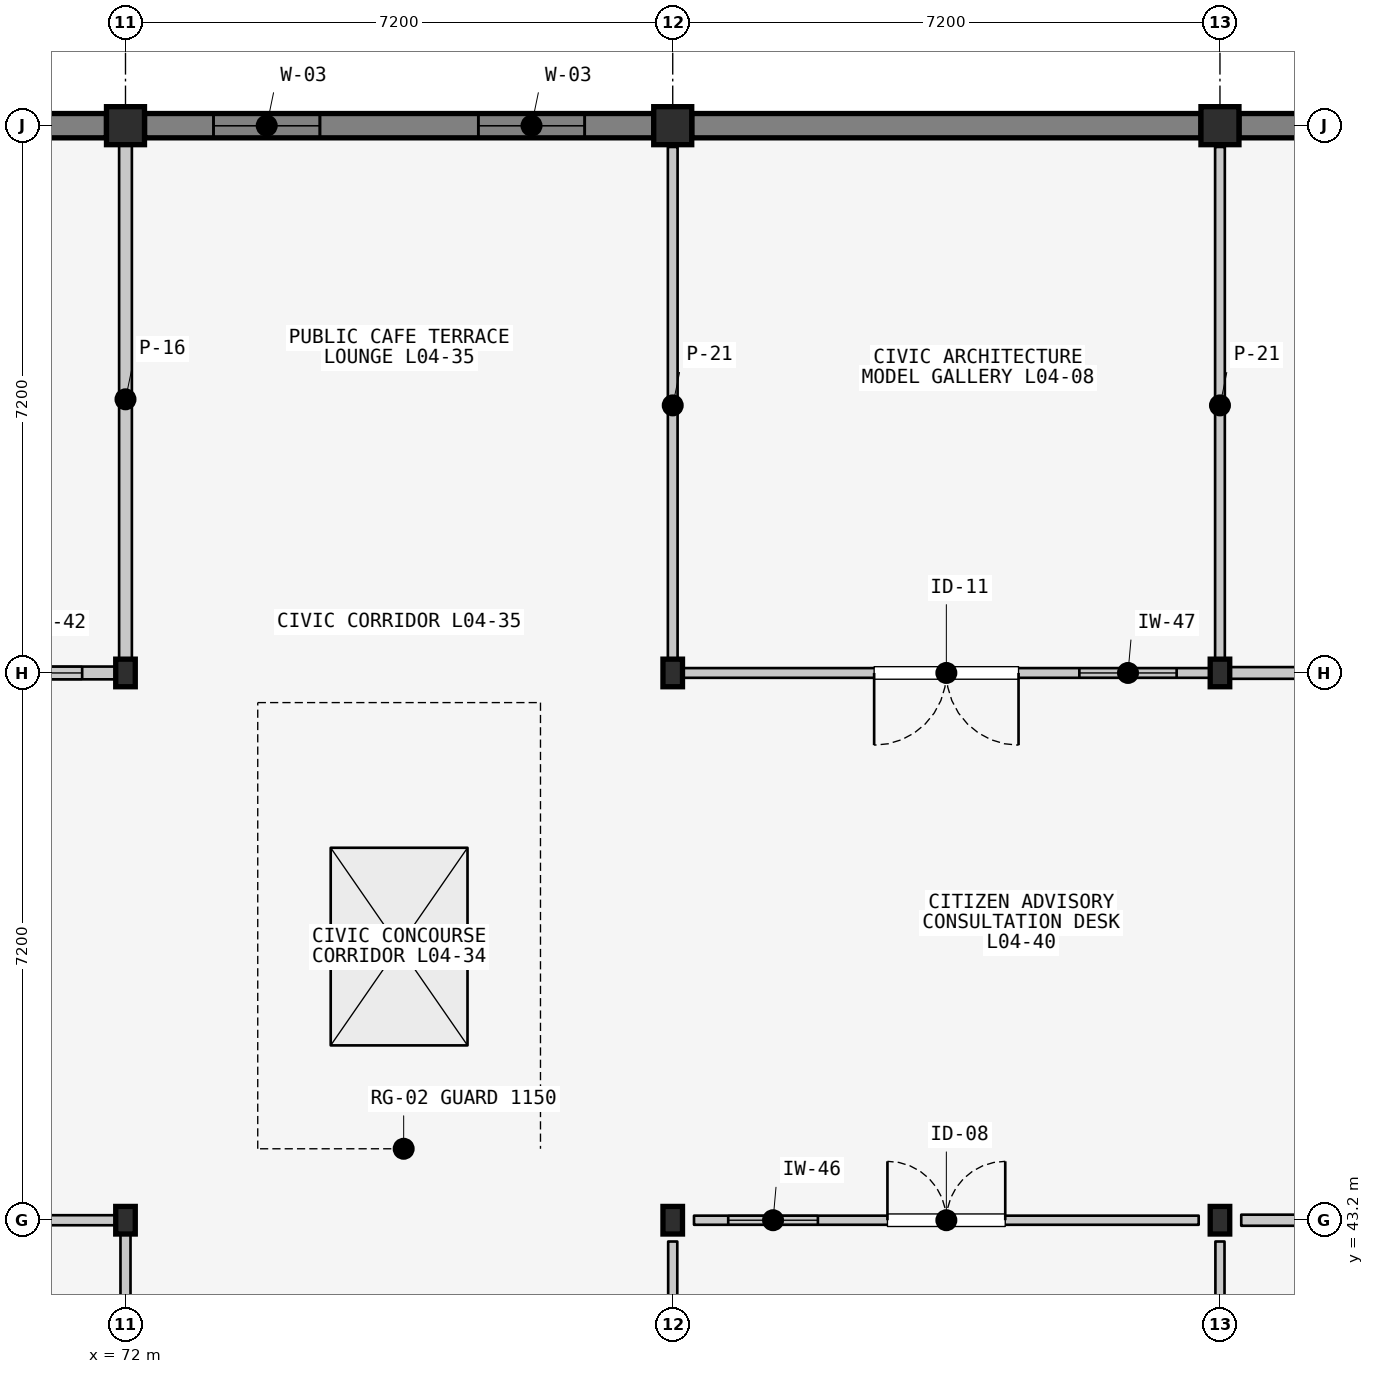
"""IFC4 building model, lengths in metres.
Left out: names, types, materials, properties, quantities, classifications, styles, units other than length and angle.
Written with IfcOpenShell. Run it as: python <this file> out.ifc"""

import sys

from ifc_helpers import new_model, si_unit, direction, frame, frame_2d, origin, origin_2d, place, context, subcontext, project, spatial, rectangle, i_section, extrude, element, fill, save


model = new_model("IFC4")
c1 = context("Model", 3, precision=1e-05, world=origin(), true_north=direction((0.0, 1.0)))
c2 = subcontext(c1, "Body", "Model", "MODEL_VIEW")
j1 = project(units=[si_unit("LENGTHUNIT", "METRE"), si_unit("PLANEANGLEUNIT", "RADIAN")], contexts=[c1])
p1 = place(None, origin())
s1 = spatial("IfcSite", under=j1, at=p1, CompositionType="ELEMENT")
p2 = place(p1, origin())
s2 = spatial("IfcBuilding", under=s1, at=p2, CompositionType="ELEMENT")
p3 = place(p2, frame((0.0, 0.0, 14.1)))
s3 = spatial("IfcBuildingStorey", under=s2, at=p3, CompositionType="ELEMENT", Elevation=14.1)
p4 = place(p3, frame((72.0, 43.2, 0.0), z_axis=(0.0, 0.0, 1.0), x_axis=(1.0, 0.0, 0.0)))
e1 = element("IfcColumn", 1, at=p4, inside=s3, PredefinedType="COLUMN", context=c2, shape_type="SweptSolid", body=[
    extrude(i_section(OverallWidth=0.257, OverallDepth=0.363, WebThickness=0.013, FlangeThickness=0.022, FilletRadius=0.015, at=origin_2d()), origin(), (0.0, 0.0, 1.0), 11.619),
])
p5 = place(p3, frame((72.0, 50.4, 0.0), z_axis=(0.0, 0.0, 1.0), x_axis=(1.0, 0.0, 0.0)))
e2 = element("IfcColumn", 2, at=p5, inside=s3, PredefinedType="COLUMN", context=c2, shape_type="SweptSolid", body=[
    extrude(i_section(OverallWidth=0.257, OverallDepth=0.363, WebThickness=0.013, FlangeThickness=0.022, FilletRadius=0.015, at=origin_2d()), origin(), (0.0, 0.0, 1.0), 12.962),
])
p6 = place(p3, frame((72.0, 57.6, 0.0), z_axis=(0.0, 0.0, 1.0), x_axis=(1.0, 0.0, 0.0)))
e3 = element("IfcColumn", 3, at=p6, inside=s3, PredefinedType="COLUMN", context=c2, shape_type="SweptSolid", body=[
    extrude(rectangle(XDim=0.5, YDim=0.5, at=origin_2d()), origin(), (0.0, 0.0, 1.0), 14.305),
])
p7 = place(p3, frame((79.2, 43.2, 0.0), z_axis=(0.0, 0.0, 1.0), x_axis=(1.0, 0.0, 0.0)))
e4 = element("IfcColumn", 4, at=p7, inside=s3, PredefinedType="COLUMN", context=c2, shape_type="SweptSolid", body=[
    extrude(i_section(OverallWidth=0.257, OverallDepth=0.363, WebThickness=0.013, FlangeThickness=0.022, FilletRadius=0.015, at=origin_2d()), origin(), (0.0, 0.0, 1.0), 11.647),
])
p8 = place(p3, frame((79.2, 50.4, 0.0), z_axis=(0.0, 0.0, 1.0), x_axis=(1.0, 0.0, 0.0)))
e5 = element("IfcColumn", 5, at=p8, inside=s3, PredefinedType="COLUMN", context=c2, shape_type="SweptSolid", body=[
    extrude(i_section(OverallWidth=0.257, OverallDepth=0.363, WebThickness=0.013, FlangeThickness=0.022, FilletRadius=0.015, at=origin_2d()), origin(), (0.0, 0.0, 1.0), 12.99),
])
p9 = place(p3, frame((79.2, 57.6, 0.0), z_axis=(0.0, 0.0, 1.0), x_axis=(1.0, 0.0, 0.0)))
e6 = element("IfcColumn", 6, at=p9, inside=s3, PredefinedType="COLUMN", context=c2, shape_type="SweptSolid", body=[
    extrude(rectangle(XDim=0.5, YDim=0.5, at=origin_2d()), origin(), (0.0, 0.0, 1.0), 14.333),
])
p10 = place(p3, frame((86.4, 43.2, 0.0), z_axis=(0.0, 0.0, 1.0), x_axis=(1.0, 0.0, 0.0)))
e7 = element("IfcColumn", 7, at=p10, inside=s3, PredefinedType="COLUMN", context=c2, shape_type="SweptSolid", body=[
    extrude(i_section(OverallWidth=0.257, OverallDepth=0.363, WebThickness=0.013, FlangeThickness=0.022, FilletRadius=0.015, at=origin_2d()), origin(), (0.0, 0.0, 1.0), 11.676),
])
p11 = place(p3, frame((86.4, 50.4, 0.0), z_axis=(0.0, 0.0, 1.0), x_axis=(1.0, 0.0, 0.0)))
e8 = element("IfcColumn", 8, at=p11, inside=s3, PredefinedType="COLUMN", context=c2, shape_type="SweptSolid", body=[
    extrude(i_section(OverallWidth=0.257, OverallDepth=0.363, WebThickness=0.013, FlangeThickness=0.022, FilletRadius=0.015, at=origin_2d()), origin(), (0.0, 0.0, 1.0), 13.019),
])
p12 = place(p3, frame((86.4, 57.6, 0.0), z_axis=(0.0, 0.0, 1.0), x_axis=(1.0, 0.0, 0.0)))
e9 = element("IfcColumn", 9, at=p12, inside=s3, PredefinedType="COLUMN", context=c2, shape_type="SweptSolid", body=[
    extrude(rectangle(XDim=0.5, YDim=0.5, at=origin_2d()), origin(), (0.0, 0.0, 1.0), 14.362),
])
p13 = place(p3, frame((65.05, 57.6, 0.0), z_axis=(0.0, 0.0, 1.0), x_axis=(1.0, 0.0, 0.0)))
e10 = element("IfcWall", 10, at=p13, inside=s3, PredefinedType="SOLIDWALL", context=c2, shape_type="SweptSolid", body=[
    extrude(rectangle(XDim=6.7, YDim=0.32, at=frame_2d((3.35, 0.0))), origin(), (0.0, 0.0, 1.0), 13.549),
])
p14 = place(p3, frame((72.25, 57.6, 0.0), z_axis=(0.0, 0.0, 1.0), x_axis=(1.0, 0.0, 0.0)))
e11 = element("IfcWall", 11, at=p14, inside=s3, PredefinedType="SOLIDWALL", context=c2, shape_type="SweptSolid", body=[
    extrude(rectangle(XDim=6.7, YDim=0.32, at=frame_2d((3.35, 0.0))), origin(), (0.0, 0.0, 1.0), 13.578),
])
p15 = place(p14, frame((0.908, 0.0, 0.95)))
e12 = element("IfcOpeningElement", 12, at=p15, cuts=e11, PredefinedType="OPENING", context=c2, shape_type="SweptSolid", body=[
    extrude(rectangle(XDim=1.4, YDim=2.1, at=frame_2d((0.7, 1.05))), frame((0.0, 0.17, 0.0), z_axis=(0.0, -1.0, 0.0), x_axis=(1.0, 0.0, 0.0)), (0.0, 0.0, 1.0), 0.34),
])
p16 = place(p14, frame((0.908, 0.0, 4.55)))
e13 = element("IfcOpeningElement", 13, at=p16, cuts=e11, PredefinedType="OPENING", context=c2, shape_type="SweptSolid", body=[
    extrude(rectangle(XDim=1.4, YDim=2.1, at=frame_2d((0.7, 1.05))), frame((0.0, 0.17, 0.0), z_axis=(0.0, -1.0, 0.0), x_axis=(1.0, 0.0, 0.0)), (0.0, 0.0, 1.0), 0.34),
])
p17 = place(p14, frame((4.392, 0.0, 0.95)))
e14 = element("IfcOpeningElement", 14, at=p17, cuts=e11, PredefinedType="OPENING", context=c2, shape_type="SweptSolid", body=[
    extrude(rectangle(XDim=1.4, YDim=2.1, at=frame_2d((0.7, 1.05))), frame((0.0, 0.17, 0.0), z_axis=(0.0, -1.0, 0.0), x_axis=(1.0, 0.0, 0.0)), (0.0, 0.0, 1.0), 0.34),
])
p18 = place(p14, frame((4.392, 0.0, 4.55)))
e15 = element("IfcOpeningElement", 15, at=p18, cuts=e11, PredefinedType="OPENING", context=c2, shape_type="SweptSolid", body=[
    extrude(rectangle(XDim=1.4, YDim=2.1, at=frame_2d((0.7, 1.05))), frame((0.0, 0.17, 0.0), z_axis=(0.0, -1.0, 0.0), x_axis=(1.0, 0.0, 0.0)), (0.0, 0.0, 1.0), 0.34),
])
p19 = place(p3, frame((79.45, 57.6, 0.0), z_axis=(0.0, 0.0, 1.0), x_axis=(1.0, 0.0, 0.0)))
e16 = element("IfcWall", 16, at=p19, inside=s3, PredefinedType="SOLIDWALL", context=c2, shape_type="SweptSolid", body=[
    extrude(rectangle(XDim=6.7, YDim=0.32, at=frame_2d((3.35, 0.0))), origin(), (0.0, 0.0, 1.0), 13.606),
])
p20 = place(p3, frame((86.65, 57.6, 0.0), z_axis=(0.0, 0.0, 1.0), x_axis=(1.0, 0.0, 0.0)))
e17 = element("IfcWall", 17, at=p20, inside=s3, PredefinedType="SOLIDWALL", context=c2, shape_type="SweptSolid", body=[
    extrude(rectangle(XDim=6.7, YDim=0.32, at=frame_2d((3.35, 0.0))), origin(), (0.0, 0.0, 1.0), 13.635),
])
for number, where, z_axis, x_axis in (
    (18, (72.0, 43.08, 0.0), (0.0, 0.0, 1.0), (0.0, -1.0, 0.0)),
    (19, (64.92, 43.2, 0.0), (0.0, 0.0, 1.0), (1.0, 0.0, 0.0)),
):
    element("IfcWall", number, at=place(p3, frame(where, z_axis=z_axis, x_axis=x_axis)), inside=s3, PredefinedType="PARTITIONING", context=c2, shape_type="SweptSolid", body=[
        extrude(rectangle(XDim=6.96, YDim=0.132, at=frame_2d((3.48, 0.0))), origin(), (0.0, 0.0, 1.0), 3.72),
    ])
p21 = place(p3, frame((71.88, 50.4, 0.0), z_axis=(0.0, 0.0, 1.0), x_axis=(-1.0, 0.0, 0.0)))
e20 = element("IfcWall", 20, at=p21, inside=s3, PredefinedType="PARTITIONING", context=c2, shape_type="SweptSolid", body=[
    extrude(rectangle(XDim=6.96, YDim=0.168, at=frame_2d((3.48, 0.0))), origin(), (0.0, 0.0, 1.0), 3.72),
])
p22 = place(p21, frame((2.53, 0.0, 0.0)))
e21 = element("IfcOpeningElement", 21, at=p22, cuts=e20, PredefinedType="OPENING", context=c2, shape_type="SweptSolid", body=[
    extrude(rectangle(XDim=1.9, YDim=2.45, at=frame_2d((0.95, 1.225))), frame((0.0, 0.094, 0.0), z_axis=(0.0, -1.0, 0.0), x_axis=(1.0, 0.0, 0.0)), (0.0, 0.0, 1.0), 0.188),
])
p23 = place(p21, frame((0.45, 0.0, 1.05)))
e22 = element("IfcOpeningElement", 22, at=p23, cuts=e20, PredefinedType="OPENING", context=c2, shape_type="SweptSolid", body=[
    extrude(rectangle(XDim=1.68, YDim=1.34, at=frame_2d((0.84, 0.67))), frame((0.0, 0.094, 0.0), z_axis=(0.0, -1.0, 0.0), x_axis=(1.0, 0.0, 0.0)), (0.0, 0.0, 1.0), 0.188),
])
p24 = place(p3, frame((72.0, 57.48, 0.0), z_axis=(0.0, 0.0, 1.0), x_axis=(0.0, -1.0, 0.0)))
e23 = element("IfcWall", 23, at=p24, inside=s3, PredefinedType="PARTITIONING", context=c2, shape_type="SweptSolid", body=[
    extrude(rectangle(XDim=6.96, YDim=0.168, at=frame_2d((3.48, 0.0))), origin(), (0.0, 0.0, 1.0), 3.72),
])
p25 = place(p3, frame((79.48, 43.2, 0.0), z_axis=(0.0, 0.0, 1.0), x_axis=(1.0, 0.0, 0.0)))
e24 = element("IfcWall", 24, at=p25, inside=s3, PredefinedType="PARTITIONING", context=c2, shape_type="SweptSolid", body=[
    extrude(rectangle(XDim=6.64, YDim=0.12, at=frame_2d((3.32, 0.0))), origin(), (0.0, 0.0, 1.0), 3.72),
])
p26 = place(p25, frame((2.545, 0.0, 0.0)))
e25 = element("IfcOpeningElement", 25, at=p26, cuts=e24, PredefinedType="OPENING", context=c2, shape_type="SweptSolid", body=[
    extrude(rectangle(XDim=1.55, YDim=2.3, at=frame_2d((0.775, 1.15))), frame((0.0, 0.07, 0.0), z_axis=(0.0, -1.0, 0.0), x_axis=(1.0, 0.0, 0.0)), (0.0, 0.0, 1.0), 0.14),
])
p27 = place(p25, frame((0.45, 0.0, 1.05)))
e26 = element("IfcOpeningElement", 26, at=p27, cuts=e24, PredefinedType="OPENING", context=c2, shape_type="SweptSolid", body=[
    extrude(rectangle(XDim=1.18, YDim=1.44, at=frame_2d((0.59, 0.72))), frame((0.0, 0.07, 0.0), z_axis=(0.0, -1.0, 0.0), x_axis=(1.0, 0.0, 0.0)), (0.0, 0.0, 1.0), 0.14),
])
for number, where, z_axis, x_axis in (
    (27, (79.2, 36.12, 0.0), (0.0, 0.0, 1.0), (0.0, 1.0, 0.0)),
    (28, (86.4, 42.92, 0.0), (0.0, 0.0, 1.0), (0.0, -1.0, 0.0)),
):
    element("IfcWall", number, at=place(p3, frame(where, z_axis=z_axis, x_axis=x_axis)), inside=s3, PredefinedType="PARTITIONING", context=c2, shape_type="SweptSolid", body=[
        extrude(rectangle(XDim=6.8, YDim=0.12, at=frame_2d((3.4, 0.0))), origin(), (0.0, 0.0, 1.0), 3.72),
    ])
p28 = place(p3, frame((86.28, 50.4, 0.0), z_axis=(0.0, 0.0, 1.0), x_axis=(-1.0, 0.0, 0.0)))
e29 = element("IfcWall", 29, at=p28, inside=s3, PredefinedType="PARTITIONING", context=c2, shape_type="SweptSolid", body=[
    extrude(rectangle(XDim=6.96, YDim=0.128, at=frame_2d((3.48, 0.0))), origin(), (0.0, 0.0, 1.0), 3.72),
])
p29 = place(p28, frame((2.53, 0.0, 0.0)))
e30 = element("IfcOpeningElement", 30, at=p29, cuts=e29, PredefinedType="OPENING", context=c2, shape_type="SweptSolid", body=[
    extrude(rectangle(XDim=1.9, YDim=2.45, at=frame_2d((0.95, 1.225))), frame((0.0, 0.074, 0.0), z_axis=(0.0, -1.0, 0.0), x_axis=(1.0, 0.0, 0.0)), (0.0, 0.0, 1.0), 0.148),
])
p30 = place(p28, frame((0.45, 0.0, 1.05)))
e31 = element("IfcOpeningElement", 31, at=p30, cuts=e29, PredefinedType="OPENING", context=c2, shape_type="SweptSolid", body=[
    extrude(rectangle(XDim=1.28, YDim=1.44, at=frame_2d((0.64, 0.72))), frame((0.0, 0.074, 0.0), z_axis=(0.0, -1.0, 0.0), x_axis=(1.0, 0.0, 0.0)), (0.0, 0.0, 1.0), 0.148),
])
for number, where, z_axis, x_axis in (
    (32, (79.2, 50.52, 0.0), (0.0, 0.0, 1.0), (0.0, 1.0, 0.0)),
    (33, (86.4, 57.32, 0.0), (0.0, 0.0, 1.0), (0.0, -1.0, 0.0)),
):
    element("IfcWall", number, at=place(p3, frame(where, z_axis=z_axis, x_axis=x_axis)), inside=s3, PredefinedType="PARTITIONING", context=c2, shape_type="SweptSolid", body=[
        extrude(rectangle(XDim=6.8, YDim=0.128, at=frame_2d((3.4, 0.0))), origin(), (0.0, 0.0, 1.0), 3.72),
    ])
p31 = place(p3, frame((86.68, 43.2, 0.0), z_axis=(0.0, 0.0, 1.0), x_axis=(1.0, 0.0, 0.0)))
e34 = element("IfcWall", 34, at=p31, inside=s3, PredefinedType="PARTITIONING", context=c2, shape_type="SweptSolid", body=[
    extrude(rectangle(XDim=6.64, YDim=0.146, at=frame_2d((3.32, 0.0))), origin(), (0.0, 0.0, 1.0), 3.72),
])
p32 = place(p3, frame((93.48, 50.4, 0.0), z_axis=(0.0, 0.0, 1.0), x_axis=(-1.0, 0.0, 0.0)))
e35 = element("IfcWall", 35, at=p32, inside=s3, PredefinedType="PARTITIONING", context=c2, shape_type="SweptSolid", body=[
    extrude(rectangle(XDim=6.96, YDim=0.154, at=frame_2d((3.48, 0.0))), origin(), (0.0, 0.0, 1.0), 3.72),
])
p33 = place(p32, frame((2.53, 0.0, 0.0)))
e36 = element("IfcOpeningElement", 36, at=p33, cuts=e35, PredefinedType="OPENING", context=c2, shape_type="SweptSolid", body=[
    extrude(rectangle(XDim=1.9, YDim=2.45, at=frame_2d((0.95, 1.225))), frame((0.0, 0.087, 0.0), z_axis=(0.0, -1.0, 0.0), x_axis=(1.0, 0.0, 0.0)), (0.0, 0.0, 1.0), 0.174),
])
p34 = place(p32, frame((0.45, 0.0, 1.05)))
e37 = element("IfcOpeningElement", 37, at=p34, cuts=e35, PredefinedType="OPENING", context=c2, shape_type="SweptSolid", body=[
    extrude(rectangle(XDim=1.6, YDim=1.2, at=frame_2d((0.8, 0.6))), frame((0.0, 0.087, 0.0), z_axis=(0.0, -1.0, 0.0), x_axis=(1.0, 0.0, 0.0)), (0.0, 0.0, 1.0), 0.174),
])
p35 = place(p15, origin())
e38 = element("IfcWindow", 38, at=p35, inside=s3, PartitioningType="SINGLE_PANEL", PredefinedType="WINDOW", context=c2, shape_type="SweptSolid", body=[
    extrude(rectangle(XDim=1.4, YDim=2.1, at=frame_2d((0.7, 1.05))), frame((0.0, 0.03, 0.0), z_axis=(0.0, -1.0, 0.0), x_axis=(1.0, 0.0, 0.0)), (0.0, 0.0, 1.0), 0.06),
])
fill(e12, e38)
p36 = place(p16, origin())
e39 = element("IfcWindow", 39, at=p36, inside=s3, PartitioningType="SINGLE_PANEL", PredefinedType="WINDOW", context=c2, shape_type="SweptSolid", body=[
    extrude(rectangle(XDim=1.4, YDim=2.1, at=frame_2d((0.7, 1.05))), frame((0.0, 0.03, 0.0), z_axis=(0.0, -1.0, 0.0), x_axis=(1.0, 0.0, 0.0)), (0.0, 0.0, 1.0), 0.06),
])
fill(e13, e39)
p37 = place(p17, origin())
e40 = element("IfcWindow", 40, at=p37, inside=s3, PartitioningType="SINGLE_PANEL", PredefinedType="WINDOW", context=c2, shape_type="SweptSolid", body=[
    extrude(rectangle(XDim=1.4, YDim=2.1, at=frame_2d((0.7, 1.05))), frame((0.0, 0.03, 0.0), z_axis=(0.0, -1.0, 0.0), x_axis=(1.0, 0.0, 0.0)), (0.0, 0.0, 1.0), 0.06),
])
fill(e14, e40)
p38 = place(p18, origin())
e41 = element("IfcWindow", 41, at=p38, inside=s3, PartitioningType="SINGLE_PANEL", PredefinedType="WINDOW", context=c2, shape_type="SweptSolid", body=[
    extrude(rectangle(XDim=1.4, YDim=2.1, at=frame_2d((0.7, 1.05))), frame((0.0, 0.03, 0.0), z_axis=(0.0, -1.0, 0.0), x_axis=(1.0, 0.0, 0.0)), (0.0, 0.0, 1.0), 0.06),
])
fill(e15, e41)
p39 = place(p3, frame((64.8, 7.2, 5.1), z_axis=(-0.003900009496, -0.183347177316, 0.983040488737), x_axis=(0.999992130387, 0.0, 0.003967261622)))
p40 = place(p39, frame((10.829, 40.283, 0.0)))
p41 = place(p40, origin())
e42 = element("IfcWindow", 42, at=p41, inside=s3, PartitioningType="SINGLE_PANEL", PredefinedType="SKYLIGHT", context=c2, shape_type="SweptSolid", body=[
    extrude(rectangle(XDim=1.8, YDim=2.6, at=origin_2d()), origin(), (0.0, 0.0, -1.0), 0.06),
])
p42 = place(p23, origin())
e43 = element("IfcWindow", 43, at=p42, inside=s3, PartitioningType="SINGLE_PANEL", PredefinedType="WINDOW", context=c2, shape_type="SweptSolid", body=[
    extrude(rectangle(XDim=1.68, YDim=1.34, at=frame_2d((0.84, 0.67))), frame((0.0, 0.03, 0.0), z_axis=(0.0, -1.0, 0.0), x_axis=(1.0, 0.0, 0.0)), (0.0, 0.0, 1.0), 0.06),
])
fill(e22, e43)
p43 = place(p26, origin())
e44 = element("IfcDoor", 44, at=p43, inside=s3, OperationType="DOUBLE_DOOR_SINGLE_SWING", PredefinedType="DOOR", context=c2, shape_type="SweptSolid", body=[
    extrude(rectangle(XDim=1.55, YDim=2.3, at=frame_2d((0.775, 1.15))), frame((0.0, 0.025, 0.0), z_axis=(0.0, -1.0, 0.0), x_axis=(1.0, 0.0, 0.0)), (0.0, 0.0, 1.0), 0.05),
])
fill(e25, e44)
p44 = place(p27, origin())
e45 = element("IfcWindow", 45, at=p44, inside=s3, PartitioningType="SINGLE_PANEL", PredefinedType="WINDOW", context=c2, shape_type="SweptSolid", body=[
    extrude(rectangle(XDim=1.18, YDim=1.44, at=frame_2d((0.59, 0.72))), frame((0.0, 0.03, 0.0), z_axis=(0.0, -1.0, 0.0), x_axis=(1.0, 0.0, 0.0)), (0.0, 0.0, 1.0), 0.06),
])
fill(e26, e45)
p45 = place(p29, origin())
e46 = element("IfcDoor", 46, at=p45, inside=s3, OperationType="DOUBLE_DOOR_SINGLE_SWING", PredefinedType="DOOR", context=c2, shape_type="SweptSolid", body=[
    extrude(rectangle(XDim=1.9, YDim=2.45, at=frame_2d((0.95, 1.225))), frame((0.0, 0.025, 0.0), z_axis=(0.0, -1.0, 0.0), x_axis=(1.0, 0.0, 0.0)), (0.0, 0.0, 1.0), 0.05),
])
fill(e30, e46)
p46 = place(p30, origin())
e47 = element("IfcWindow", 47, at=p46, inside=s3, PartitioningType="SINGLE_PANEL", PredefinedType="WINDOW", context=c2, shape_type="SweptSolid", body=[
    extrude(rectangle(XDim=1.28, YDim=1.44, at=frame_2d((0.64, 0.72))), frame((0.0, 0.03, 0.0), z_axis=(0.0, -1.0, 0.0), x_axis=(1.0, 0.0, 0.0)), (0.0, 0.0, 1.0), 0.06),
])
fill(e31, e47)
save(model, sys.argv[1])
